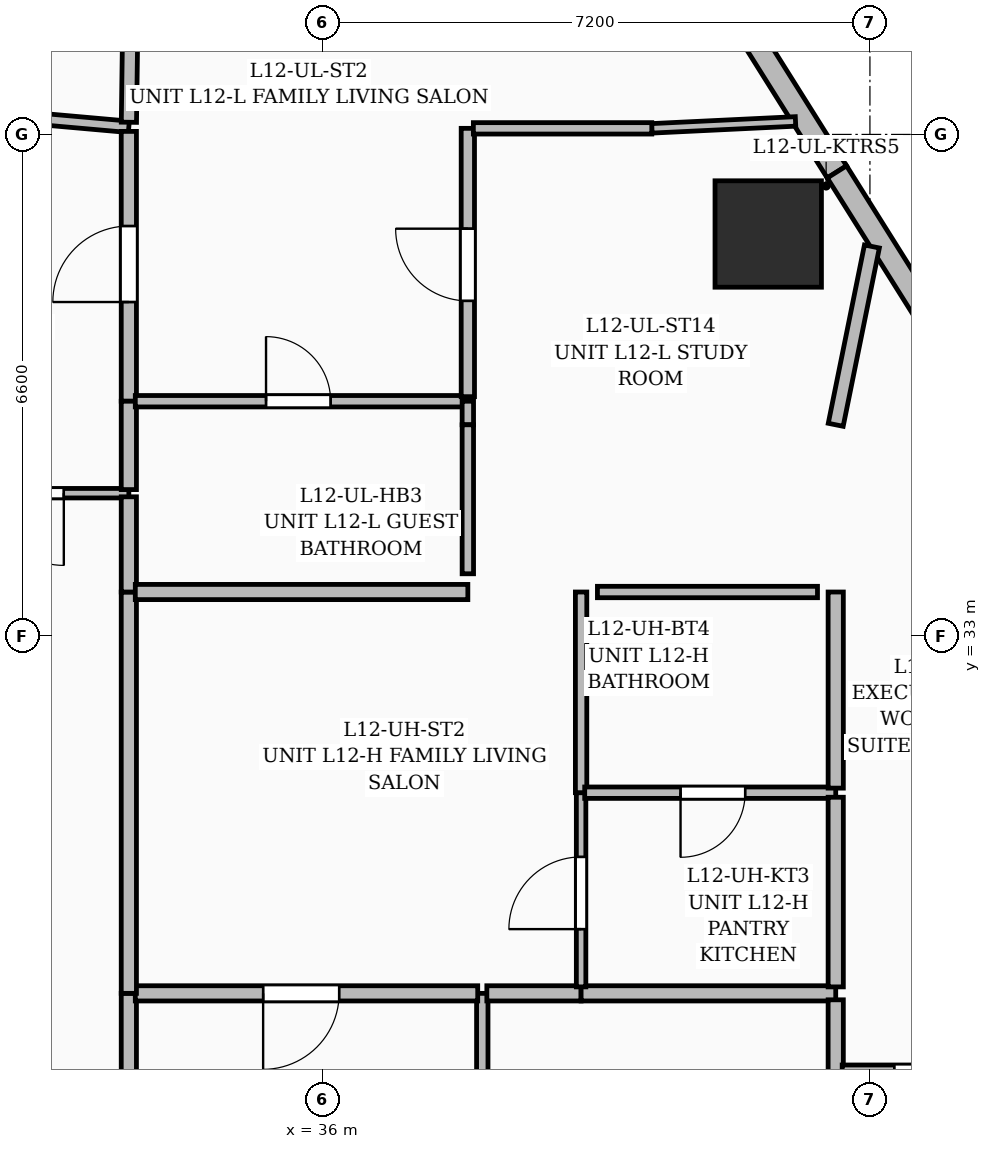
"""IFC4 building model, lengths in metres.
Left out: names, types, materials, properties, quantities, classifications, styles, units other than length and angle.
Written with IfcOpenShell. Run it as: python <this file> out.ifc"""

import sys

from ifc_helpers import new_model, si_unit, direction, frame, frame_2d, origin, origin_2d, place, context, subcontext, project, spatial, rectangle, extrude, element, fill, save


model = new_model("IFC4")
c1 = context("Model", 3, precision=1e-05, world=origin(), true_north=direction((0.0, 1.0)))
c2 = subcontext(c1, "Body", "Model", "MODEL_VIEW")
j1 = project(units=[si_unit("LENGTHUNIT", "METRE"), si_unit("PLANEANGLEUNIT", "RADIAN")], contexts=[c1])
p1 = place(None, origin())
s1 = spatial("IfcSite", under=j1, at=p1, CompositionType="ELEMENT")
p2 = place(p1, origin())
s2 = spatial("IfcBuilding", under=s1, at=p2, CompositionType="ELEMENT")
p3 = place(p2, frame((0.0, 0.0, 53.4)))
s3 = spatial("IfcBuildingStorey", under=s2, at=p3, CompositionType="ELEMENT", Elevation=53.4)
p4 = place(p3, frame((41.862, 38.29, 0.0), z_axis=(0.0, 0.0, 1.0), x_axis=(1.0, 0.0, 0.0)))
e1 = element("IfcColumn", 1, at=p4, inside=s3, PredefinedType="COLUMN", context=c2, shape_type="SweptSolid", body=[
    extrude(rectangle(XDim=1.4, YDim=1.4, at=origin_2d()), origin(), (0.0, 0.0, 1.0), 3.6),
])
p5 = place(p3, frame((29.713, 39.121, 0.0), z_axis=(0.0, 0.0, 1.0), x_axis=(0.539533296006, 0.841964264385, 0.0)))
e2 = element("IfcWall", 2, at=p5, inside=s3, PredefinedType="SOLIDWALL", context=c2, shape_type="SweptSolid", body=[
    extrude(rectangle(XDim=7.149, YDim=0.3, at=frame_2d((3.575, 0.0))), origin(), (0.0, 0.0, 1.0), 3.35),
])
p6 = place(p5, frame((2.65, 0.0, 0.6)))
e3 = element("IfcOpeningElement", 3, at=p6, cuts=e2, PredefinedType="OPENING", context=c2, shape_type="SweptSolid", body=[
    extrude(rectangle(XDim=1.5, YDim=2.1, at=frame_2d((0.75, 1.05))), frame((0.0, 0.16, 0.0), z_axis=(0.0, -1.0, 0.0), x_axis=(1.0, 0.0, 0.0)), (0.0, 0.0, 1.0), 0.32),
])
p7 = place(p3, frame((39.287, 44.646, 0.0), z_axis=(0.0, 0.0, 1.0), x_axis=(0.531900124003, -0.846807096147, 0.0)))
e4 = element("IfcWall", 4, at=p7, inside=s3, PredefinedType="SOLIDWALL", context=c2, shape_type="SweptSolid", body=[
    extrude(rectangle(XDim=6.54, YDim=0.3, at=frame_2d((3.27, 0.0))), origin(), (0.0, 0.0, 1.0), 3.35),
])
p8 = place(p7, frame((2.42, 0.0, 0.55)))
e5 = element("IfcOpeningElement", 5, at=p8, cuts=e4, PredefinedType="OPENING", context=c2, shape_type="SweptSolid", body=[
    extrude(rectangle(XDim=1.6, YDim=2.2, at=frame_2d((0.8, 1.1))), frame((0.0, 0.16, 0.0), z_axis=(0.0, -1.0, 0.0), x_axis=(1.0, 0.0, 0.0)), (0.0, 0.0, 1.0), 0.32),
])
p9 = place(p3, frame((42.765, 39.107, 0.0), z_axis=(0.0, 0.0, 1.0), x_axis=(0.531921360547, -0.846793756586, 0.0)))
e6 = element("IfcWall", 6, at=p9, inside=s3, PredefinedType="SOLIDWALL", context=c2, shape_type="SweptSolid", body=[
    extrude(rectangle(XDim=7.095, YDim=0.3, at=frame_2d((3.548, 0.0))), origin(), (0.0, 0.0, 1.0), 3.35),
])
p10 = place(p9, frame((5.175, 0.0, 0.8)))
e7 = element("IfcOpeningElement", 7, at=p10, cuts=e6, PredefinedType="OPENING", context=c2, shape_type="SweptSolid", body=[
    extrude(rectangle(XDim=1.2, YDim=1.8, at=frame_2d((0.6, 0.9))), frame((0.0, 0.16, 0.0), z_axis=(0.0, -1.0, 0.0), x_axis=(1.0, 0.0, 0.0)), (0.0, 0.0, 1.0), 0.32),
])
p11 = place(p3, frame((38.1, 24.548, 0.0), z_axis=(0.0, 0.0, 1.0), x_axis=(0.0, 1.0, 0.0)))
e8 = element("IfcWall", 8, at=p11, inside=s3, PredefinedType="PARTITIONING", context=c2, shape_type="SweptSolid", body=[
    extrude(rectangle(XDim=3.752, YDim=0.15, at=frame_2d((1.876, 0.0))), origin(), (0.0, 0.0, 1.0), 2.309),
])
p12 = place(p3, frame((33.45, 28.3, 0.0), z_axis=(0.0, 0.0, 1.0), x_axis=(0.0, -1.0, 0.0)))
e9 = element("IfcWall", 9, at=p12, inside=s3, PredefinedType="PARTITIONING", context=c2, shape_type="SweptSolid", body=[
    extrude(rectangle(XDim=3.752, YDim=0.2, at=frame_2d((1.876, 0.0))), origin(), (0.0, 0.0, 1.0), 3.01),
])
p13 = place(p3, frame((38.04, 28.3, 0.0), z_axis=(0.0, 0.0, 1.0), x_axis=(-1.0, 0.0, 0.0)))
e10 = element("IfcWall", 10, at=p13, inside=s3, PredefinedType="PARTITIONING", context=c2, shape_type="SweptSolid", body=[
    extrude(rectangle(XDim=4.505, YDim=0.2, at=frame_2d((2.252, 0.0))), origin(), (0.0, 0.0, 1.0), 2.279),
])
p14 = place(p13, frame((1.823, 0.0, 0.0)))
e11 = element("IfcOpeningElement", 11, at=p14, cuts=e10, PredefinedType="OPENING", context=c2, shape_type="SweptSolid", body=[
    extrude(rectangle(XDim=1.0, YDim=2.2, at=frame_2d((0.5, 1.1))), frame((0.0, 0.11, 0.0), z_axis=(0.0, -1.0, 0.0), x_axis=(1.0, 0.0, 0.0)), (0.0, 0.0, 1.0), 0.22),
])
p15 = place(p3, frame((39.4, 28.3, 0.0), z_axis=(0.0, 0.0, 1.0), x_axis=(-1.0, 0.0, 0.0)))
e12 = element("IfcWall", 12, at=p15, inside=s3, PredefinedType="PARTITIONING", context=c2, shape_type="SweptSolid", body=[
    extrude(rectangle(XDim=1.24, YDim=0.2, at=frame_2d((0.62, 0.0))), origin(), (0.0, 0.0, 1.0), 3.35),
])
p16 = place(p3, frame((42.75, 28.3, 0.0), z_axis=(0.0, 0.0, 1.0), x_axis=(-1.0, 0.0, 0.0)))
e13 = element("IfcWall", 13, at=p16, inside=s3, PredefinedType="PARTITIONING", context=c2, shape_type="SweptSolid", body=[
    extrude(rectangle(XDim=3.35, YDim=0.2, at=frame_2d((1.675, 0.0))), origin(), (0.0, 0.0, 1.0), 2.279),
])
p17 = place(p3, frame((42.75, 27.27, 0.0), z_axis=(0.0, 0.0, 1.0), x_axis=(0.0, 1.0, 0.0)))
e14 = element("IfcWall", 14, at=p17, inside=s3, PredefinedType="PARTITIONING", context=c2, shape_type="SweptSolid", body=[
    extrude(rectangle(XDim=0.945, YDim=0.2, at=frame_2d((0.473, 0.0))), origin(), (0.0, 0.0, 1.0), 2.279),
])
p18 = place(p3, frame((33.45, 34.88, 0.0), z_axis=(0.0, 0.0, 1.0), x_axis=(-1.0, 0.0, 0.0)))
e15 = element("IfcWall", 15, at=p18, inside=s3, PredefinedType="PARTITIONING", context=c2, shape_type="SweptSolid", body=[
    extrude(rectangle(XDim=2.695, YDim=0.125, at=frame_2d((1.348, 0.0))), origin(), (0.0, 0.0, 1.0), 2.279),
])
p19 = place(p18, frame((0.855, 0.0, 0.0)))
e16 = element("IfcOpeningElement", 16, at=p19, cuts=e15, PredefinedType="OPENING", context=c2, shape_type="SweptSolid", body=[
    extrude(rectangle(XDim=0.95, YDim=2.2, at=frame_2d((0.475, 1.1))), frame((0.0, 0.072, 0.0), z_axis=(0.0, -1.0, 0.0), x_axis=(1.0, 0.0, 0.0)), (0.0, 0.0, 1.0), 0.145),
])
p20 = place(p3, frame((33.45, 28.3, 0.0), z_axis=(0.0, 0.0, 1.0), x_axis=(0.0, 1.0, 0.0)))
e17 = element("IfcWall", 17, at=p20, inside=s3, PredefinedType="PARTITIONING", context=c2, shape_type="SweptSolid", body=[
    extrude(rectangle(XDim=5.28, YDim=0.2, at=frame_2d((2.64, 0.0))), origin(), (0.0, 0.0, 1.0), 2.279),
])
p21 = place(p3, frame((33.45, 33.58, 0.0), z_axis=(0.0, 0.0, 1.0), x_axis=(0.0, 1.0, 0.0)))
e18 = element("IfcWall", 18, at=p21, inside=s3, PredefinedType="PARTITIONING", context=c2, shape_type="SweptSolid", body=[
    extrude(rectangle(XDim=1.252, YDim=0.2, at=frame_2d((0.626, 0.0))), origin(), (0.0, 0.0, 1.0), 2.279),
])
p22 = place(p3, frame((33.45, 39.7, 0.0), z_axis=(0.0, 0.0, 1.0), x_axis=(-0.996078574379, 0.088473010928, 0.0)))
e19 = element("IfcWall", 19, at=p22, inside=s3, PredefinedType="PARTITIONING", context=c2, shape_type="SweptSolid", body=[
    extrude(rectangle(XDim=3.063, YDim=0.15, at=frame_2d((1.531, 0.0))), origin(), (0.0, 0.0, 1.0), 3.35),
])
p23 = place(p22, frame((1.178, 0.0, 0.0)))
e20 = element("IfcOpeningElement", 20, at=p23, cuts=e19, PredefinedType="OPENING", context=c2, shape_type="SweptSolid", body=[
    extrude(rectangle(XDim=0.85, YDim=2.1, at=frame_2d((0.425, 1.05))), frame((0.0, 0.085, 0.0), z_axis=(0.0, -1.0, 0.0), x_axis=(1.0, 0.0, 0.0)), (0.0, 0.0, 1.0), 0.17),
])
p24 = place(p3, frame((33.45, 36.09, 0.0), z_axis=(0.0, 0.0, 1.0), x_axis=(0.0, 1.0, 0.0)))
e21 = element("IfcWall", 21, at=p24, inside=s3, PredefinedType="PARTITIONING", context=c2, shape_type="SweptSolid", body=[
    extrude(rectangle(XDim=3.55, YDim=0.2, at=frame_2d((1.775, 0.0))), origin(), (0.0, 0.0, 1.0), 2.37),
])
p25 = place(p24, frame((1.305, 0.0, 0.0)))
e22 = element("IfcOpeningElement", 22, at=p25, cuts=e21, PredefinedType="OPENING", context=c2, shape_type="SweptSolid", body=[
    extrude(rectangle(XDim=1.0, YDim=2.2, at=frame_2d((0.5, 1.1))), frame((0.0, 0.11, 0.0), z_axis=(0.0, -1.0, 0.0), x_axis=(1.0, 0.0, 0.0)), (0.0, 0.0, 1.0), 0.22),
])
p26 = place(p3, frame((33.45, 34.927, 0.0), z_axis=(0.0, 0.0, 1.0), x_axis=(0.0, 1.0, 0.0)))
e23 = element("IfcWall", 23, at=p26, inside=s3, PredefinedType="PARTITIONING", context=c2, shape_type="SweptSolid", body=[
    extrude(rectangle(XDim=1.163, YDim=0.2, at=frame_2d((0.581, 0.0))), origin(), (0.0, 0.0, 1.0), 3.35),
])
p27 = place(p3, frame((33.451, 39.76, 0.0), z_axis=(0.0, 0.0, 1.0), x_axis=(0.013754757877, 0.999905398843, 0.0)))
e24 = element("IfcWall", 24, at=p27, inside=s3, PredefinedType="PARTITIONING", context=c2, shape_type="SweptSolid", body=[
    extrude(rectangle(XDim=3.727, YDim=0.2, at=frame_2d((1.864, 0.0))), origin(), (0.0, 0.0, 1.0), 3.35),
])
p28 = place(p3, frame((39.4, 28.385, 0.0), z_axis=(0.0, 0.0, 1.0), x_axis=(0.0, 1.0, 0.0)))
e25 = element("IfcWall", 25, at=p28, inside=s3, PredefinedType="PARTITIONING", context=c2, shape_type="SweptSolid", body=[
    extrude(rectangle(XDim=2.555, YDim=0.125, at=frame_2d((1.277, 0.0))), origin(), (0.0, 0.0, 1.0), 3.01),
])
p29 = place(p28, frame((0.76, 0.0, 0.0)))
e26 = element("IfcOpeningElement", 26, at=p29, cuts=e25, PredefinedType="OPENING", context=c2, shape_type="SweptSolid", body=[
    extrude(rectangle(XDim=0.95, YDim=2.2, at=frame_2d((0.475, 1.1))), frame((0.0, 0.072, 0.0), z_axis=(0.0, -1.0, 0.0), x_axis=(1.0, 0.0, 0.0)), (0.0, 0.0, 1.0), 0.145),
])
p30 = place(p3, frame((39.4, 30.94, 0.0), z_axis=(0.0, 0.0, 1.0), x_axis=(0.0, 1.0, 0.0)))
e27 = element("IfcWall", 27, at=p30, inside=s3, PredefinedType="PARTITIONING", context=c2, shape_type="SweptSolid", body=[
    extrude(rectangle(XDim=2.64, YDim=0.15, at=frame_2d((1.32, 0.0))), origin(), (0.0, 0.0, 1.0), 3.01),
])
p31 = place(p3, frame((37.91, 33.58, 0.0), z_axis=(0.0, 0.0, 1.0), x_axis=(-1.0, 0.0, 0.0)))
e28 = element("IfcWall", 28, at=p31, inside=s3, PredefinedType="PARTITIONING", context=c2, shape_type="SweptSolid", body=[
    extrude(rectangle(XDim=4.375, YDim=0.2, at=frame_2d((2.188, 0.0))), origin(), (0.0, 0.0, 1.0), 2.279),
])
p32 = place(p3, frame((42.75, 30.94, 0.0), z_axis=(0.0, 0.0, 1.0), x_axis=(-1.0, 0.0, 0.0)))
e29 = element("IfcWall", 29, at=p32, inside=s3, PredefinedType="PARTITIONING", context=c2, shape_type="SweptSolid", body=[
    extrude(rectangle(XDim=3.302, YDim=0.15, at=frame_2d((1.651, 0.0))), origin(), (0.0, 0.0, 1.0), 2.279),
])
p33 = place(p32, frame((1.192, 0.0, 0.0)))
e30 = element("IfcOpeningElement", 30, at=p33, cuts=e29, PredefinedType="OPENING", context=c2, shape_type="SweptSolid", body=[
    extrude(rectangle(XDim=0.85, YDim=2.1, at=frame_2d((0.425, 1.05))), frame((0.0, 0.085, 0.0), z_axis=(0.0, -1.0, 0.0), x_axis=(1.0, 0.0, 0.0)), (0.0, 0.0, 1.0), 0.17),
])
p34 = place(p3, frame((42.75, 28.385, 0.0), z_axis=(0.0, 0.0, 1.0), x_axis=(0.0, 1.0, 0.0)))
e31 = element("IfcWall", 31, at=p34, inside=s3, PredefinedType="PARTITIONING", context=c2, shape_type="SweptSolid", body=[
    extrude(rectangle(XDim=2.495, YDim=0.2, at=frame_2d((1.248, 0.0))), origin(), (0.0, 0.0, 1.0), 2.279),
])
p35 = place(p3, frame((42.75, 31.0, 0.0), z_axis=(0.0, 0.0, 1.0), x_axis=(0.0, 1.0, 0.0)))
e32 = element("IfcWall", 32, at=p35, inside=s3, PredefinedType="PARTITIONING", context=c2, shape_type="SweptSolid", body=[
    extrude(rectangle(XDim=2.58, YDim=0.2, at=frame_2d((1.29, 0.0))), origin(), (0.0, 0.0, 1.0), 2.279),
])
p36 = place(p3, frame((44.722, 27.27, 0.0), z_axis=(0.0, 0.0, 1.0), x_axis=(-1.0, 0.0, 0.0)))
e33 = element("IfcWall", 33, at=p36, inside=s3, PredefinedType="PARTITIONING", context=c2, shape_type="SweptSolid", body=[
    extrude(rectangle(XDim=1.887, YDim=0.175, at=frame_2d((0.944, 0.0))), origin(), (0.0, 0.0, 1.0), 2.279),
])
p37 = place(p36, frame((0.302, 0.0, 0.0)))
e34 = element("IfcOpeningElement", 34, at=p37, cuts=e33, PredefinedType="OPENING", context=c2, shape_type="SweptSolid", body=[
    extrude(rectangle(XDim=0.9, YDim=2.15, at=frame_2d((0.45, 1.075))), frame((0.0, 0.097, 0.0), z_axis=(0.0, -1.0, 0.0), x_axis=(1.0, 0.0, 0.0)), (0.0, 0.0, 1.0), 0.195),
])
p38 = place(p3, frame((43.226, 38.126, 0.0), z_axis=(0.0, 0.0, 1.0), x_axis=(-0.198880858248, -0.980023675338, 0.0)))
e35 = element("IfcWall", 35, at=p38, inside=s3, PredefinedType="PARTITIONING", context=c2, shape_type="SweptSolid", body=[
    extrude(rectangle(XDim=2.394, YDim=0.2, at=frame_2d((1.197, 0.0))), origin(), (0.0, 0.0, 1.0), 2.37),
])
p39 = place(p3, frame((33.535, 36.09, 0.0), z_axis=(0.0, 0.0, 1.0), x_axis=(1.0, 0.0, 0.0)))
e36 = element("IfcWall", 36, at=p39, inside=s3, PredefinedType="PARTITIONING", context=c2, shape_type="SweptSolid", body=[
    extrude(rectangle(XDim=4.375, YDim=0.15, at=frame_2d((2.188, 0.0))), origin(), (0.0, 0.0, 1.0), 3.35),
])
p40 = place(p39, frame((1.72, 0.0, 0.0)))
e37 = element("IfcOpeningElement", 37, at=p40, cuts=e36, PredefinedType="OPENING", context=c2, shape_type="SweptSolid", body=[
    extrude(rectangle(XDim=0.85, YDim=2.1, at=frame_2d((0.425, 1.05))), frame((0.0, 0.085, 0.0), z_axis=(0.0, -1.0, 0.0), x_axis=(1.0, 0.0, 0.0)), (0.0, 0.0, 1.0), 0.17),
])
p41 = place(p3, frame((40.33, 39.68, 0.0), z_axis=(0.0, 0.0, 1.0), x_axis=(0.998842315683, 0.048104349096, 0.0)))
e38 = element("IfcWall", 38, at=p41, inside=s3, PredefinedType="PARTITIONING", context=c2, shape_type="SweptSolid", body=[
    extrude(rectangle(XDim=1.893, YDim=0.125, at=frame_2d((0.947, 0.0))), origin(), (0.0, 0.0, 1.0), 3.35),
])
p42 = place(p3, frame((37.91, 36.15, 0.0), z_axis=(0.0, 0.0, 1.0), x_axis=(0.0, 1.0, 0.0)))
e39 = element("IfcWall", 39, at=p42, inside=s3, PredefinedType="PARTITIONING", context=c2, shape_type="SweptSolid", body=[
    extrude(rectangle(XDim=3.53, YDim=0.175, at=frame_2d((1.765, 0.0))), origin(), (0.0, 0.0, 1.0), 2.37),
])
p43 = place(p42, frame((1.26, 0.0, 0.0)))
e40 = element("IfcOpeningElement", 40, at=p43, cuts=e39, PredefinedType="OPENING", context=c2, shape_type="SweptSolid", body=[
    extrude(rectangle(XDim=0.95, YDim=2.2, at=frame_2d((0.475, 1.1))), frame((0.0, 0.097, 0.0), z_axis=(0.0, -1.0, 0.0), x_axis=(1.0, 0.0, 0.0)), (0.0, 0.0, 1.0), 0.195),
])
p44 = place(p3, frame((37.982, 39.68, 0.0), z_axis=(0.0, 0.0, 1.0), x_axis=(1.0, 0.0, 0.0)))
e41 = element("IfcWall", 41, at=p44, inside=s3, PredefinedType="PARTITIONING", context=c2, shape_type="SweptSolid", body=[
    extrude(rectangle(XDim=2.348, YDim=0.15, at=frame_2d((1.174, 0.0))), origin(), (0.0, 0.0, 1.0), 3.35),
])
p45 = place(p3, frame((37.91, 35.78, 0.0), z_axis=(0.0, 0.0, 1.0), x_axis=(0.0, 1.0, 0.0)))
e42 = element("IfcWall", 42, at=p45, inside=s3, PredefinedType="PARTITIONING", context=c2, shape_type="SweptSolid", body=[
    extrude(rectangle(XDim=0.31, YDim=0.15, at=frame_2d((0.155, 0.0))), origin(), (0.0, 0.0, 1.0), 3.35),
])
p46 = place(p3, frame((42.51, 33.58, 0.0), z_axis=(0.0, 0.0, 1.0), x_axis=(-1.0, 0.0, 0.0)))
e43 = element("IfcWall", 43, at=p46, inside=s3, PredefinedType="PARTITIONING", context=c2, shape_type="SweptSolid", body=[
    extrude(rectangle(XDim=2.895, YDim=0.15, at=frame_2d((1.448, 0.0))), origin(), (0.0, 0.0, 1.0), 2.279),
])
p47 = place(p3, frame((37.91, 33.82, 0.0), z_axis=(0.0, 0.0, 1.0), x_axis=(0.0, 1.0, 0.0)))
e44 = element("IfcWall", 44, at=p47, inside=s3, PredefinedType="PARTITIONING", context=c2, shape_type="SweptSolid", body=[
    extrude(rectangle(XDim=1.96, YDim=0.15, at=frame_2d((0.98, 0.0))), origin(), (0.0, 0.0, 1.0), 3.01),
])
p48 = place(p19, origin())
e45 = element("IfcDoor", 45, at=p48, inside=s3, OperationType="SINGLE_SWING_LEFT", PredefinedType="DOOR", context=c2, shape_type="SweptSolid", body=[
    extrude(rectangle(XDim=0.95, YDim=2.2, at=frame_2d((0.475, 1.1))), frame((0.0, 0.025, 0.0), z_axis=(0.0, -1.0, 0.0), x_axis=(1.0, 0.0, 0.0)), (0.0, 0.0, 1.0), 0.05),
])
fill(e16, e45)
p49 = place(p29, origin())
e46 = element("IfcDoor", 46, at=p49, inside=s3, OperationType="SINGLE_SWING_LEFT", PredefinedType="DOOR", context=c2, shape_type="SweptSolid", body=[
    extrude(rectangle(XDim=0.95, YDim=2.2, at=frame_2d((0.475, 1.1))), frame((0.0, 0.025, 0.0), z_axis=(0.0, -1.0, 0.0), x_axis=(1.0, 0.0, 0.0)), (0.0, 0.0, 1.0), 0.05),
])
fill(e26, e46)
p50 = place(p33, origin())
e47 = element("IfcDoor", 47, at=p50, inside=s3, OperationType="SINGLE_SWING_RIGHT", PredefinedType="DOOR", context=c2, shape_type="SweptSolid", body=[
    extrude(rectangle(XDim=0.85, YDim=2.1, at=frame_2d((0.425, 1.05))), frame((0.0, 0.025, 0.0), z_axis=(0.0, -1.0, 0.0), x_axis=(1.0, 0.0, 0.0)), (0.0, 0.0, 1.0), 0.05),
])
fill(e30, e47)
p51 = place(p43, origin())
e48 = element("IfcDoor", 48, at=p51, inside=s3, OperationType="SINGLE_SWING_RIGHT", PredefinedType="DOOR", context=c2, shape_type="SweptSolid", body=[
    extrude(rectangle(XDim=0.95, YDim=2.2, at=frame_2d((0.475, 1.1))), frame((0.0, 0.025, 0.0), z_axis=(0.0, -1.0, 0.0), x_axis=(1.0, 0.0, 0.0)), (0.0, 0.0, 1.0), 0.05),
])
fill(e40, e48)
p52 = place(p40, origin())
e49 = element("IfcDoor", 49, at=p52, inside=s3, OperationType="SINGLE_SWING_LEFT", PredefinedType="DOOR", context=c2, shape_type="SweptSolid", body=[
    extrude(rectangle(XDim=0.85, YDim=2.1, at=frame_2d((0.425, 1.05))), frame((0.0, 0.025, 0.0), z_axis=(0.0, -1.0, 0.0), x_axis=(1.0, 0.0, 0.0)), (0.0, 0.0, 1.0), 0.05),
])
fill(e37, e49)
p53 = place(p14, origin())
e50 = element("IfcDoor", 50, at=p53, inside=s3, OperationType="SINGLE_SWING_RIGHT", PredefinedType="DOOR", context=c2, shape_type="SweptSolid", body=[
    extrude(rectangle(XDim=1.0, YDim=2.2, at=frame_2d((0.5, 1.1))), frame((0.0, 0.025, 0.0), z_axis=(0.0, -1.0, 0.0), x_axis=(1.0, 0.0, 0.0)), (0.0, 0.0, 1.0), 0.05),
])
fill(e11, e50)
p54 = place(p25, origin())
e51 = element("IfcDoor", 51, at=p54, inside=s3, OperationType="SINGLE_SWING_LEFT", PredefinedType="DOOR", context=c2, shape_type="SweptSolid", body=[
    extrude(rectangle(XDim=1.0, YDim=2.2, at=frame_2d((0.5, 1.1))), frame((0.0, 0.025, 0.0), z_axis=(0.0, -1.0, 0.0), x_axis=(1.0, 0.0, 0.0)), (0.0, 0.0, 1.0), 0.05),
])
fill(e22, e51)
save(model, sys.argv[1])
